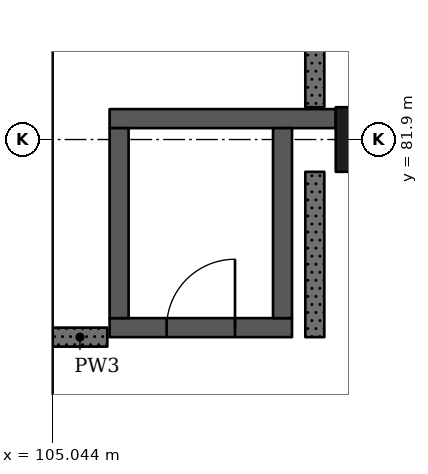
"""IFC4 building model, lengths in metres.
Left out: names, types, materials, properties, quantities, classifications, styles, units other than length and angle.
Written with IfcOpenShell. Run it as: python <this file> out.ifc"""

import sys

from ifc_helpers import new_model, si_unit, direction, frame, frame_2d, origin, origin_2d, place, context, subcontext, project, spatial, rectangle, extrude, element, fill, save


model = new_model("IFC4")
c1 = context("Model", 3, precision=1e-05, world=origin(), true_north=direction((0.0, 1.0)))
c2 = subcontext(c1, "Body", "Model", "MODEL_VIEW")
j1 = project(units=[si_unit("LENGTHUNIT", "METRE"), si_unit("PLANEANGLEUNIT", "RADIAN")], contexts=[c1])
p1 = place(None, origin())
s1 = spatial("IfcSite", under=j1, at=p1, CompositionType="ELEMENT")
p2 = place(p1, origin())
s2 = spatial("IfcBuilding", under=s1, at=p2, CompositionType="ELEMENT")
p3 = place(p2, origin())
s3 = spatial("IfcBuildingStorey", under=s2, at=p3, CompositionType="ELEMENT", Elevation=0.0)
p4 = place(p3, frame((109.2, 81.9, -0.4), z_axis=(0.0, 0.0, 1.0), x_axis=(1.0, 0.0, 0.0)))
e1 = element("IfcColumn", 1, at=p4, inside=s3, PredefinedType="COLUMN", context=c2, shape_type="SweptSolid", body=[
    extrude(rectangle(XDim=0.85, YDim=0.85, at=origin_2d()), origin(), (0.0, 0.0, 1.0), 6.77),
])
p5 = place(p3, frame((108.2, 79.425, -0.4), z_axis=(0.0, 0.0, 1.0), x_axis=(-1.0, 0.0, 0.0)))
e2 = element("IfcWall", 2, at=p5, inside=s3, PredefinedType="SHEAR", context=c2, shape_type="SweptSolid", body=[
    extrude(rectangle(XDim=2.4, YDim=0.25, at=frame_2d((1.2, 0.0))), origin(), (0.0, 0.0, 1.0), 6.77),
])
p6 = place(p5, frame((0.75, 0.0, 0.4)))
e3 = element("IfcOpeningElement", 3, at=p6, cuts=e2, PredefinedType="OPENING", context=c2, shape_type="SweptSolid", body=[
    extrude(rectangle(XDim=0.9, YDim=2.1, at=frame_2d((0.45, 1.05))), frame((0.0, 0.135, 0.0), z_axis=(0.0, -1.0, 0.0), x_axis=(1.0, 0.0, 0.0)), (0.0, 0.0, 1.0), 0.27),
])
p7 = place(p3, frame((108.775, 82.175, -0.4), z_axis=(0.0, 0.0, 1.0), x_axis=(-1.0, 0.0, 0.0)))
e4 = element("IfcWall", 4, at=p7, inside=s3, PredefinedType="SHEAR", context=c2, shape_type="SweptSolid", body=[
    extrude(rectangle(XDim=2.975, YDim=0.25, at=frame_2d((1.487, 0.0))), origin(), (0.0, 0.0, 1.0), 6.77),
])
for number, where, z_axis, x_axis in (
    (5, (105.925, 82.05, -0.4), (0.0, 0.0, 1.0), (0.0, -1.0, 0.0)),
    (6, (108.075, 82.05, -0.4), (0.0, 0.0, 1.0), (0.0, -1.0, 0.0)),
):
    element("IfcWall", number, at=place(p3, frame(where, z_axis=z_axis, x_axis=x_axis)), inside=s3, PredefinedType="SHEAR", context=c2, shape_type="SweptSolid", body=[
        extrude(rectangle(XDim=2.5, YDim=0.25, at=frame_2d((1.25, 0.0))), origin(), (0.0, 0.0, 1.0), 6.77),
    ])
p8 = place(p3, frame((105.77, 79.3, 0.0), z_axis=(0.0, 0.0, 1.0), x_axis=(-1.0, 0.0, 0.0)))
e7 = element("IfcWall", 7, at=p8, inside=s3, PredefinedType="SOLIDWALL", context=c2, shape_type="SweptSolid", body=[
    extrude(rectangle(XDim=0.72, YDim=0.25, at=frame_2d((0.36, 0.0))), origin(), (0.0, 0.0, 1.0), 6.02),
])
p9 = place(p3, frame((108.5, 79.3, 0.0), z_axis=(0.0, 0.0, 1.0), x_axis=(0.0, 1.0, 0.0)))
e8 = element("IfcWall", 8, at=p9, inside=s3, PredefinedType="SOLIDWALL", context=c2, shape_type="SweptSolid", body=[
    extrude(rectangle(XDim=2.175, YDim=0.25, at=frame_2d((1.087, 0.0))), origin(), (0.0, 0.0, 1.0), 6.02),
])
p10 = place(p3, frame((108.5, 82.325, 0.0), z_axis=(0.0, 0.0, 1.0), x_axis=(0.0, 1.0, 0.0)))
e9 = element("IfcWall", 9, at=p10, inside=s3, PredefinedType="SOLIDWALL", context=c2, shape_type="SweptSolid", body=[
    extrude(rectangle(XDim=6.95, YDim=0.25, at=frame_2d((3.475, 0.0))), origin(), (0.0, 0.0, 1.0), 6.02),
])
p11 = place(p6, origin())
e10 = element("IfcDoor", 10, at=p11, inside=s3, OperationType="SINGLE_SWING_LEFT", PredefinedType="DOOR", context=c2, shape_type="SweptSolid", body=[
    extrude(rectangle(XDim=0.9, YDim=2.1, at=frame_2d((0.45, 1.05))), frame((0.0, 0.025, 0.0), z_axis=(0.0, -1.0, 0.0), x_axis=(1.0, 0.0, 0.0)), (0.0, 0.0, 1.0), 0.05),
])
fill(e3, e10)
save(model, sys.argv[1])
